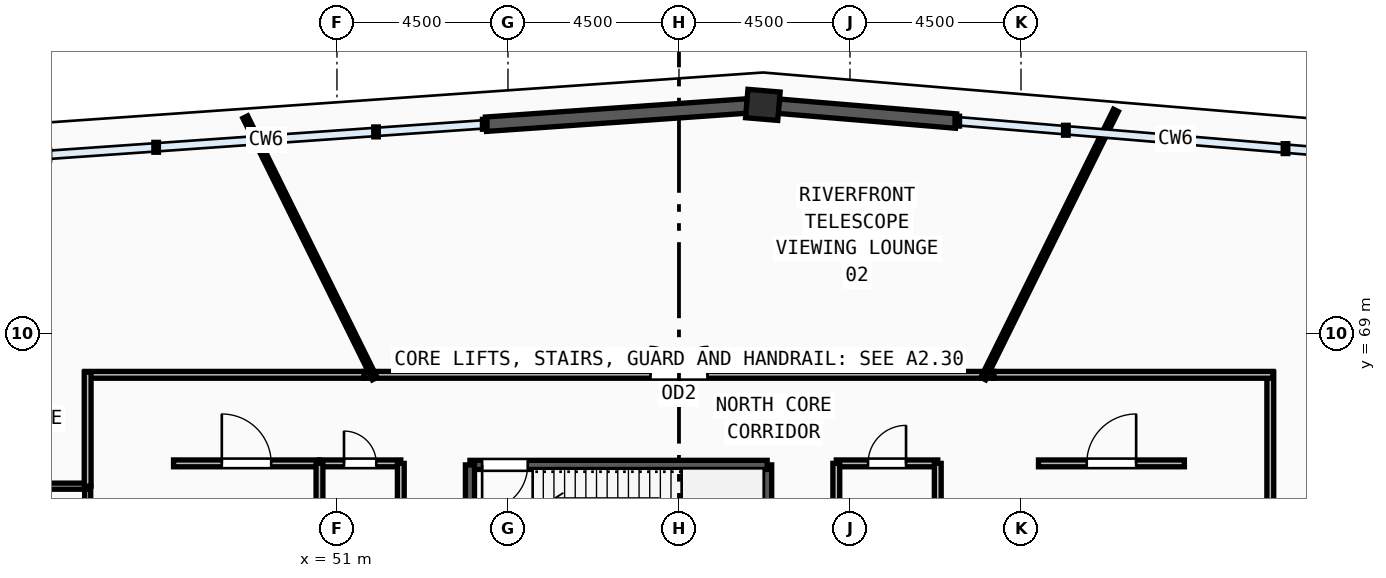
"""IFC4 building model, lengths in metres.
Left out: names, types, materials, properties, quantities, classifications, styles, units other than length and angle.
Written with IfcOpenShell. Run it as: python <this file> out.ifc"""

import sys

from ifc_helpers import new_model, si_unit, direction, frame, frame_2d, origin, origin_2d, place, context, subcontext, project, spatial, rectangle, extrude, source, transform, mapped, element, fill, save


model = new_model("IFC4")
c1 = context("Model", 3, precision=1e-05, world=origin(), true_north=direction((0.0, 1.0)))
c2 = subcontext(c1, "Body", "Model", "MODEL_VIEW")
j1 = project(units=[si_unit("LENGTHUNIT", "METRE"), si_unit("PLANEANGLEUNIT", "RADIAN")], contexts=[c1])
p1 = place(None, origin())
s1 = spatial("IfcSite", under=j1, at=p1, CompositionType="ELEMENT")
p2 = place(p1, origin())
s2 = spatial("IfcBuilding", under=s1, at=p2, CompositionType="ELEMENT")
p3 = place(p2, frame((0.0, 0.0, 351.0)))
s3 = spatial("IfcBuildingStorey", under=s2, at=p3, CompositionType="ELEMENT", Elevation=351.0)
m1 = source(origin(), c2, "Body", "SweptSolid", [
    extrude(rectangle(XDim=0.85, YDim=0.75, at=origin_2d()), origin(), (0.0, 0.0, 1.0), 4.8),
])
p4 = place(p3, frame((62.207, 75.013, 0.0), z_axis=(0.0, 0.0, 1.0), x_axis=(-0.996507448611, 0.083503921245, 0.0)))
e1 = element("IfcColumn", 1, at=p4, inside=s3, PredefinedType="COLUMN", context=c2, shape_type="MappedRepresentation", body=[
    mapped(m1, transform((0.0, 0.0, 0.0), x_axis=(1.0, 0.0, 0.0), y_axis=(0.0, 1.0, 0.0), z_axis=(0.0, 0.0, 1.0), scale=1.0)),
])
p5 = place(p3, frame((67.291, 74.587, 0.0), z_axis=(0.0, 0.0, 1.0), x_axis=(-0.996511180492, 0.083459374276, 0.0)))
e2 = element("IfcWall", 2, at=p5, inside=s3, PredefinedType="SOLIDWALL", context=c2, shape_type="SweptSolid", body=[
    extrude(rectangle(XDim=4.686, YDim=0.38, at=frame_2d((2.343, 0.0))), origin(), (0.0, 0.0, 1.0), 4.52),
])
p6 = place(p3, frame((61.793, 74.984, 0.0), z_axis=(0.0, 0.0, 1.0), x_axis=(-0.997569718887, -0.06967536121, 0.0)))
e3 = element("IfcWall", 3, at=p6, inside=s3, PredefinedType="SOLIDWALL", context=c2, shape_type="SweptSolid", body=[
    extrude(rectangle(XDim=6.889, YDim=0.38, at=frame_2d((3.444, 0.0))), origin(), (0.0, 0.0, 1.0), 4.52),
])
p7 = place(p3, frame((62.32, 62.1, 0.0), z_axis=(0.0, 0.0, 1.0), x_axis=(0.0, 1.0, 0.0)))
e4 = element("IfcWall", 4, at=p7, inside=s3, PredefinedType="SOLIDWALL", context=c2, shape_type="SweptSolid", body=[
    extrude(rectangle(XDim=3.44, YDim=0.24, at=frame_2d((1.72, 0.0))), origin(), (0.0, 0.0, 1.0), 4.52),
])
p8 = place(p3, frame((62.32, 65.54, 0.0), z_axis=(0.0, 0.0, 1.0), x_axis=(-1.0, 0.0, 0.0)))
e5 = element("IfcWall", 5, at=p8, inside=s3, PredefinedType="SOLIDWALL", context=c2, shape_type="SweptSolid", body=[
    extrude(rectangle(XDim=7.82, YDim=0.24, at=frame_2d((3.91, 0.0))), origin(), (0.0, 0.0, 1.0), 4.52),
])
m2 = source(origin(), c2, "Body", "SweptSolid", [
    extrude(rectangle(XDim=1.2, YDim=2.2, at=frame_2d((0.6, 1.1))), frame((0.0, 0.13, 0.0), z_axis=(0.0, -1.0, 0.0), x_axis=(1.0, 0.0, 0.0)), (0.0, 0.0, 1.0), 0.26),
])
p9 = place(p8, frame((6.3, 0.0, 0.0)))
e6 = element("IfcOpeningElement", 6, at=p9, cuts=e5, PredefinedType="OPENING", context=c2, shape_type="MappedRepresentation", body=[
    mapped(m2, transform((0.0, 0.0, 0.0), x_axis=(1.0, 0.0, 0.0), y_axis=(0.0, 1.0, 0.0), z_axis=(0.0, 0.0, 1.0), scale=1.0)),
])
p10 = place(p3, frame((54.5, 65.54, 0.0), z_axis=(0.0, 0.0, 1.0), x_axis=(0.0, -1.0, 0.0)))
e7 = element("IfcWall", 7, at=p10, inside=s3, PredefinedType="SOLIDWALL", context=c2, shape_type="SweptSolid", body=[
    extrude(rectangle(XDim=3.44, YDim=0.24, at=frame_2d((1.72, 0.0))), origin(), (0.0, 0.0, 1.0), 4.52),
])
p11 = place(p3, frame((44.44, 62.24, 0.0), z_axis=(0.0, 0.0, 1.0), x_axis=(0.0, 1.0, 0.0)))
e8 = element("IfcWall", 8, at=p11, inside=s3, PredefinedType="PARTITIONING", context=c2, shape_type="SweptSolid", body=[
    extrude(rectangle(XDim=2.74, YDim=0.16, at=frame_2d((1.37, 0.0))), origin(), (0.0, 0.0, 1.0), 4.52),
])
m3 = source(origin(), c2, "Body", "SweptSolid", [
    extrude(rectangle(XDim=1.05, YDim=2.15, at=frame_2d((0.525, 1.075))), frame((0.0, 0.09, 0.0), z_axis=(0.0, -1.0, 0.0), x_axis=(1.0, 0.0, 0.0)), (0.0, 0.0, 1.0), 0.18),
])
p12 = place(p11, frame((0.845, 0.0, 0.0)))
e9 = element("IfcOpeningElement", 9, at=p12, cuts=e8, PredefinedType="OPENING", context=c2, shape_type="MappedRepresentation", body=[
    mapped(m3, transform((0.0, 0.0, 0.0), x_axis=(1.0, 0.0, 0.0), y_axis=(0.0, 1.0, 0.0), z_axis=(0.0, 0.0, 1.0), scale=1.0)),
])
p13 = place(p3, frame((50.54, 65.58, 0.0), z_axis=(0.0, 0.0, 1.0), x_axis=(1.0, 0.0, 0.0)))
e10 = element("IfcWall", 10, at=p13, inside=s3, PredefinedType="PARTITIONING", context=c2, shape_type="SweptSolid", body=[
    extrude(rectangle(XDim=2.14, YDim=0.18, at=frame_2d((1.07, 0.0))), origin(), (0.0, 0.0, 1.0), 4.52),
])
m4 = source(origin(), c2, "Body", "SweptSolid", [
    extrude(rectangle(XDim=0.85, YDim=2.1, at=frame_2d((0.425, 1.05))), frame((0.0, 0.1, 0.0), z_axis=(0.0, -1.0, 0.0), x_axis=(1.0, 0.0, 0.0)), (0.0, 0.0, 1.0), 0.2),
])
p14 = place(p13, frame((0.645, 0.0, 0.0)))
e11 = element("IfcOpeningElement", 11, at=p14, cuts=e10, PredefinedType="OPENING", context=c2, shape_type="MappedRepresentation", body=[
    mapped(m4, transform((0.0, 0.0, 0.0), x_axis=(1.0, 0.0, 0.0), y_axis=(0.0, 1.0, 0.0), z_axis=(0.0, 0.0, 1.0), scale=1.0)),
])
p15 = place(p3, frame((64.14, 65.58, 0.0), z_axis=(0.0, 0.0, 1.0), x_axis=(1.0, 0.0, 0.0)))
e12 = element("IfcWall", 12, at=p15, inside=s3, PredefinedType="PARTITIONING", context=c2, shape_type="SweptSolid", body=[
    extrude(rectangle(XDim=2.67, YDim=0.18, at=frame_2d((1.335, 0.0))), origin(), (0.0, 0.0, 1.0), 4.52),
])
m5 = source(origin(), c2, "Body", "SweptSolid", [
    extrude(rectangle(XDim=1.0, YDim=2.2, at=frame_2d((0.5, 1.1))), frame((0.0, 0.1, 0.0), z_axis=(0.0, -1.0, 0.0), x_axis=(1.0, 0.0, 0.0)), (0.0, 0.0, 1.0), 0.2),
])
p16 = place(p15, frame((0.835, 0.0, 0.0)))
e13 = element("IfcOpeningElement", 13, at=p16, cuts=e12, PredefinedType="OPENING", context=c2, shape_type="MappedRepresentation", body=[
    mapped(m5, transform((0.0, 0.0, 0.0), x_axis=(1.0, 0.0, 0.0), y_axis=(0.0, 1.0, 0.0), z_axis=(0.0, 0.0, 1.0), scale=1.0)),
])
p17 = place(p3, frame((46.7, 65.58, 0.0), z_axis=(0.0, 0.0, 1.0), x_axis=(1.0, 0.0, 0.0)))
e14 = element("IfcWall", 14, at=p17, inside=s3, PredefinedType="PARTITIONING", context=c2, shape_type="SweptSolid", body=[
    extrude(rectangle(XDim=3.84, YDim=0.18, at=frame_2d((1.92, 0.0))), origin(), (0.0, 0.0, 1.0), 4.52),
])
m6 = source(origin(), c2, "Body", "SweptSolid", [
    extrude(rectangle(XDim=1.3, YDim=2.2, at=frame_2d((0.65, 1.1))), frame((0.0, 0.1, 0.0), z_axis=(0.0, -1.0, 0.0), x_axis=(1.0, 0.0, 0.0)), (0.0, 0.0, 1.0), 0.2),
])
p18 = place(p17, frame((1.27, 0.0, 0.0)))
e15 = element("IfcOpeningElement", 15, at=p18, cuts=e14, PredefinedType="OPENING", context=c2, shape_type="MappedRepresentation", body=[
    mapped(m6, transform((0.0, 0.0, 0.0), x_axis=(1.0, 0.0, 0.0), y_axis=(0.0, 1.0, 0.0), z_axis=(0.0, 0.0, 1.0), scale=1.0)),
])
p19 = place(p3, frame((69.46, 65.58, 0.0), z_axis=(0.0, 0.0, 1.0), x_axis=(1.0, 0.0, 0.0)))
e16 = element("IfcWall", 16, at=p19, inside=s3, PredefinedType="PARTITIONING", context=c2, shape_type="SweptSolid", body=[
    extrude(rectangle(XDim=3.84, YDim=0.18, at=frame_2d((1.92, 0.0))), origin(), (0.0, 0.0, 1.0), 4.52),
])
p20 = place(p19, frame((1.27, 0.0, 0.0)))
e17 = element("IfcOpeningElement", 17, at=p20, cuts=e16, PredefinedType="OPENING", context=c2, shape_type="MappedRepresentation", body=[
    mapped(m6, transform((0.0, 0.0, 0.0), x_axis=(1.0, 0.0, 0.0), y_axis=(0.0, 1.0, 0.0), z_axis=(0.0, 0.0, 1.0), scale=1.0)),
])
p21 = place(p3, frame((75.56, 67.98, 0.0), z_axis=(0.0, 0.0, 1.0), x_axis=(0.0, -1.0, 0.0)))
e18 = element("IfcWall", 18, at=p21, inside=s3, PredefinedType="PARTITIONING", context=c2, shape_type="SweptSolid", body=[
    extrude(rectangle(XDim=23.195, YDim=0.18, at=frame_2d((11.598, 0.0))), origin(), (0.0, 0.0, 1.0), 4.52),
])
m7 = source(origin(), c2, "Body", "SweptSolid", [
    extrude(rectangle(XDim=1.5, YDim=2.2, at=frame_2d((0.75, 1.1))), frame((0.0, 0.1, 0.0), z_axis=(0.0, -1.0, 0.0), x_axis=(1.0, 0.0, 0.0)), (0.0, 0.0, 1.0), 0.2),
])
p22 = place(p21, frame((10.848, 0.0, 0.0)))
e19 = element("IfcOpeningElement", 19, at=p22, cuts=e18, PredefinedType="OPENING", context=c2, shape_type="MappedRepresentation", body=[
    mapped(m7, transform((0.0, 0.0, 0.0), x_axis=(1.0, 0.0, 0.0), y_axis=(0.0, 1.0, 0.0), z_axis=(0.0, 0.0, 1.0), scale=1.0)),
])
p23 = place(p3, frame((51.714, 67.91, 0.0), z_axis=(0.0, 0.0, 1.0), x_axis=(1.0, 0.0, 0.0)))
e20 = element("IfcWall", 20, at=p23, inside=s3, PredefinedType="PARTITIONING", context=c2, shape_type="SweptSolid", body=[
    extrude(rectangle(XDim=16.572, YDim=0.18, at=frame_2d((8.286, 0.0))), origin(), (0.0, 0.0, 1.0), 4.52),
])
p24 = place(p23, frame((7.536, 0.0, 0.0)))
e21 = element("IfcOpeningElement", 21, at=p24, cuts=e20, PredefinedType="OPENING", context=c2, shape_type="MappedRepresentation", body=[
    mapped(m7, transform((0.0, 0.0, 0.0), x_axis=(1.0, 0.0, 0.0), y_axis=(0.0, 1.0, 0.0), z_axis=(0.0, 0.0, 1.0), scale=1.0)),
])
p25 = place(p3, frame((39.98, 64.98, 0.0), z_axis=(0.0, 0.0, 1.0), x_axis=(1.0, 0.0, 0.0)))
e22 = element("IfcWall", 22, at=p25, inside=s3, PredefinedType="PARTITIONING", context=c2, shape_type="SweptSolid", body=[
    extrude(rectangle(XDim=4.46, YDim=0.16, at=frame_2d((2.23, 0.0))), origin(), (0.0, 0.0, 1.0), 4.52),
])
p26 = place(p3, frame((50.54, 61.95, 0.0), z_axis=(0.0, 0.0, 1.0), x_axis=(0.0, 1.0, 0.0)))
e23 = element("IfcWall", 23, at=p26, inside=s3, PredefinedType="PARTITIONING", context=c2, shape_type="SweptSolid", body=[
    extrude(rectangle(XDim=3.63, YDim=0.18, at=frame_2d((1.815, 0.0))), origin(), (0.0, 0.0, 1.0), 4.52),
])
for number, where, z_axis, x_axis in (
    (24, (52.68, 61.775, 0.0), (0.0, 0.0, 1.0), (0.0, 1.0, 0.0)),
    (25, (64.14, 61.775, 0.0), (0.0, 0.0, 1.0), (0.0, 1.0, 0.0)),
    (26, (66.81, 61.775, 0.0), (0.0, 0.0, 1.0), (0.0, 1.0, 0.0)),
):
    element("IfcWall", number, at=place(p3, frame(where, z_axis=z_axis, x_axis=x_axis)), inside=s3, PredefinedType="PARTITIONING", context=c2, shape_type="SweptSolid", body=[
        extrude(rectangle(XDim=3.805, YDim=0.18, at=frame_2d((1.903, 0.0))), origin(), (0.0, 0.0, 1.0), 4.52),
    ])
for number, where, z_axis, x_axis in (
    (27, (68.286, 67.91, 0.0), (0.0, 0.0, 1.0), (1.0, 0.0, 0.0)),
    (28, (44.37, 67.91, 0.0), (0.0, 0.0, 1.0), (1.0, 0.0, 0.0)),
):
    element("IfcWall", number, at=place(p3, frame(where, z_axis=z_axis, x_axis=x_axis)), inside=s3, PredefinedType="PARTITIONING", context=c2, shape_type="SweptSolid", body=[
        extrude(rectangle(XDim=7.344, YDim=0.18, at=frame_2d((3.672, 0.0))), origin(), (0.0, 0.0, 1.0), 4.52),
    ])
p27 = place(p3, frame((44.44, 64.98, 0.0), z_axis=(0.0, 0.0, 1.0), x_axis=(0.0, 1.0, 0.0)))
e29 = element("IfcWall", 29, at=p27, inside=s3, PredefinedType="PARTITIONING", context=c2, shape_type="SweptSolid", body=[
    extrude(rectangle(XDim=3.0, YDim=0.18, at=frame_2d((1.5, 0.0))), origin(), (0.0, 0.0, 1.0), 4.52),
])
p28 = place(p3, frame((51.995, 67.81, 0.0), z_axis=(0.0, 0.0, 1.0), x_axis=(-0.443700227648, 0.896175266332, 0.0)))
e30 = element("IfcWall", 30, at=p28, inside=s3, PredefinedType="PARTITIONING", context=c2, shape_type="SweptSolid", body=[
    extrude(rectangle(XDim=7.679, YDim=0.14, at=frame_2d((3.84, 0.0))), origin(), (0.0, 0.0, 1.0), 4.52),
])
p29 = place(p3, frame((68.005, 67.81, 0.0), z_axis=(0.0, 0.0, 1.0), x_axis=(0.44362577634, 0.896212123644, 0.0)))
e31 = element("IfcWall", 31, at=p29, inside=s3, PredefinedType="PARTITIONING", context=c2, shape_type="SweptSolid", body=[
    extrude(rectangle(XDim=7.874, YDim=0.14, at=frame_2d((3.937, 0.0))), origin(), (0.0, 0.0, 1.0), 4.52),
])
m8 = source(origin(), c2, "Body", "SweptSolid", [
    extrude(rectangle(XDim=1.2, YDim=2.2, at=frame_2d((0.6, 1.1))), frame((0.0, 0.025, 0.0), z_axis=(0.0, -1.0, 0.0), x_axis=(1.0, 0.0, 0.0)), (0.0, 0.0, 1.0), 0.05),
])
p30 = place(p9, origin())
e32 = element("IfcDoor", 32, at=p30, inside=s3, OperationType="SINGLE_SWING_RIGHT", PredefinedType="DOOR", context=c2, shape_type="MappedRepresentation", body=[
    mapped(m8, transform((0.0, 0.0, 0.0), x_axis=(1.0, 0.0, 0.0), y_axis=(0.0, 1.0, 0.0), z_axis=(0.0, 0.0, 1.0), scale=1.0)),
])
fill(e6, e32)
m9 = source(origin(), c2, "Body", "SweptSolid", [
    extrude(rectangle(XDim=0.85, YDim=2.1, at=frame_2d((0.425, 1.05))), frame((0.0, 0.025, 0.0), z_axis=(0.0, -1.0, 0.0), x_axis=(1.0, 0.0, 0.0)), (0.0, 0.0, 1.0), 0.05),
])
p31 = place(p14, origin())
e33 = element("IfcDoor", 33, at=p31, inside=s3, OperationType="SINGLE_SWING_LEFT", PredefinedType="DOOR", context=c2, shape_type="MappedRepresentation", body=[
    mapped(m9, transform((0.0, 0.0, 0.0), x_axis=(1.0, 0.0, 0.0), y_axis=(0.0, 1.0, 0.0), z_axis=(0.0, 0.0, 1.0), scale=1.0)),
])
fill(e11, e33)
m10 = source(origin(), c2, "Body", "SweptSolid", [
    extrude(rectangle(XDim=1.0, YDim=2.2, at=frame_2d((0.5, 1.1))), frame((0.0, 0.025, 0.0), z_axis=(0.0, -1.0, 0.0), x_axis=(1.0, 0.0, 0.0)), (0.0, 0.0, 1.0), 0.05),
])
p32 = place(p16, origin())
e34 = element("IfcDoor", 34, at=p32, inside=s3, OperationType="SINGLE_SWING_RIGHT", PredefinedType="DOOR", context=c2, shape_type="MappedRepresentation", body=[
    mapped(m10, transform((0.0, 0.0, 0.0), x_axis=(1.0, 0.0, 0.0), y_axis=(0.0, 1.0, 0.0), z_axis=(0.0, 0.0, 1.0), scale=1.0)),
])
fill(e13, e34)
m11 = source(origin(), c2, "Body", "SweptSolid", [
    extrude(rectangle(XDim=1.3, YDim=2.2, at=frame_2d((0.65, 1.1))), frame((0.0, 0.025, 0.0), z_axis=(0.0, -1.0, 0.0), x_axis=(1.0, 0.0, 0.0)), (0.0, 0.0, 1.0), 0.05),
])
p33 = place(p18, origin())
e35 = element("IfcDoor", 35, at=p33, inside=s3, OperationType="SINGLE_SWING_LEFT", PredefinedType="DOOR", context=c2, shape_type="MappedRepresentation", body=[
    mapped(m11, transform((0.0, 0.0, 0.0), x_axis=(1.0, 0.0, 0.0), y_axis=(0.0, 1.0, 0.0), z_axis=(0.0, 0.0, 1.0), scale=1.0)),
])
fill(e15, e35)
p34 = place(p20, origin())
e36 = element("IfcDoor", 36, at=p34, inside=s3, OperationType="SINGLE_SWING_RIGHT", PredefinedType="DOOR", context=c2, shape_type="MappedRepresentation", body=[
    mapped(m11, transform((0.0, 0.0, 0.0), x_axis=(1.0, 0.0, 0.0), y_axis=(0.0, 1.0, 0.0), z_axis=(0.0, 0.0, 1.0), scale=1.0)),
])
fill(e17, e36)
m12 = source(origin(), c2, "Body", "SweptSolid", [
    extrude(rectangle(XDim=1.5, YDim=2.2, at=frame_2d((0.75, 1.1))), frame((0.0, 0.025, 0.0), z_axis=(0.0, -1.0, 0.0), x_axis=(1.0, 0.0, 0.0)), (0.0, 0.0, 1.0), 0.05),
])
p35 = place(p24, origin())
e37 = element("IfcDoor", 37, at=p35, inside=s3, OperationType="DOUBLE_DOOR_SINGLE_SWING", PredefinedType="DOOR", context=c2, shape_type="MappedRepresentation", body=[
    mapped(m12, transform((0.0, 0.0, 0.0), x_axis=(1.0, 0.0, 0.0), y_axis=(0.0, 1.0, 0.0), z_axis=(0.0, 0.0, 1.0), scale=1.0)),
])
fill(e21, e37)
save(model, sys.argv[1])
